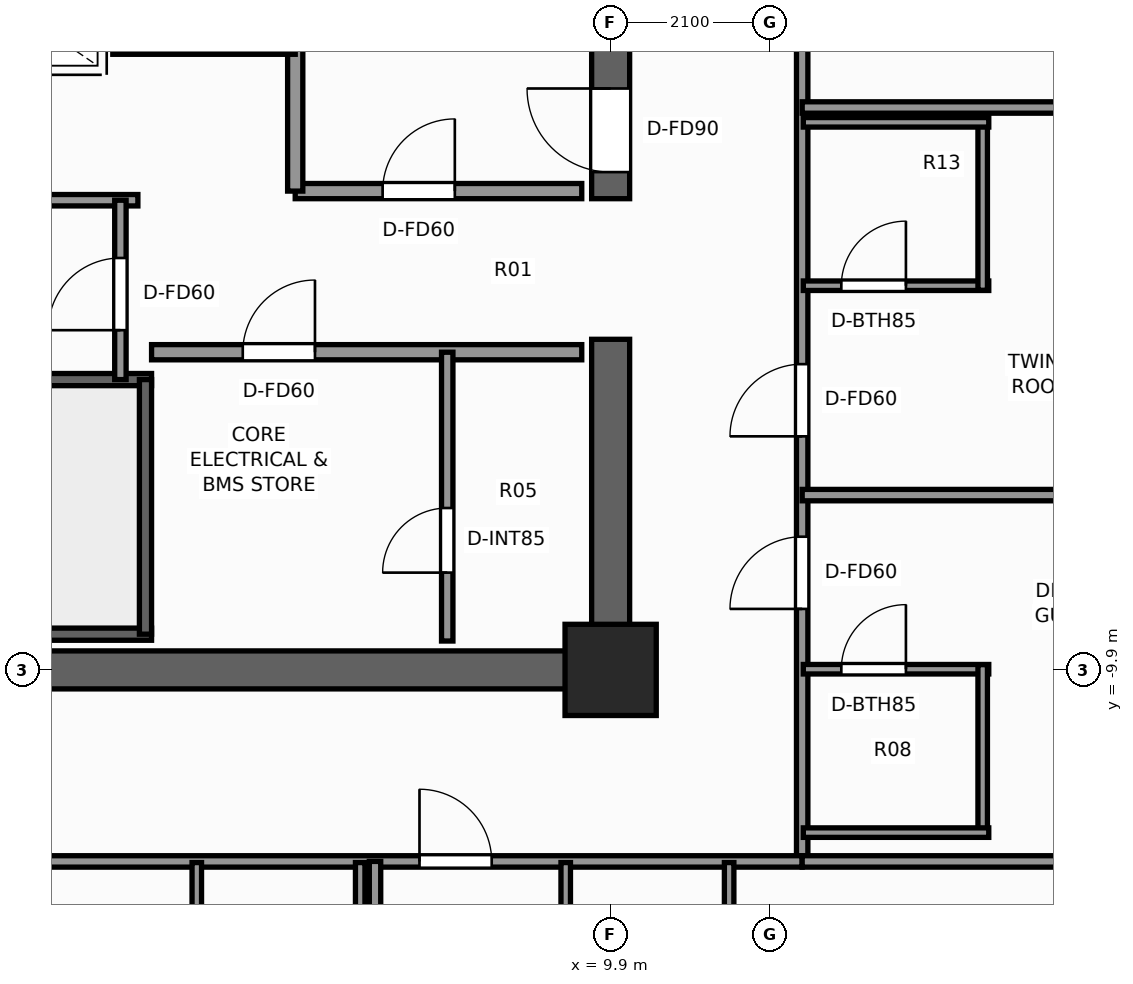
"""IFC4 building model, lengths in metres.
Left out: names, types, materials, properties, quantities, classifications, styles, units other than length and angle.
Written with IfcOpenShell. Run it as: python <this file> out.ifc"""

import sys

from ifc_helpers import new_model, si_unit, direction, frame, frame_2d, origin, origin_2d, place, context, subcontext, project, spatial, rectangle, extrude, element, fill, save


model = new_model("IFC4")
c1 = context("Model", 3, precision=1e-05, world=origin(), true_north=direction((0.0, 1.0)))
c2 = subcontext(c1, "Body", "Model", "MODEL_VIEW")
j1 = project(units=[si_unit("LENGTHUNIT", "METRE"), si_unit("PLANEANGLEUNIT", "RADIAN")], contexts=[c1])
p1 = place(None, origin())
s1 = spatial("IfcSite", under=j1, at=p1, CompositionType="ELEMENT")
p2 = place(p1, origin())
s2 = spatial("IfcBuilding", under=s1, at=p2, CompositionType="ELEMENT")
p3 = place(p2, frame((0.0, 0.0, 141.5)))
s3 = spatial("IfcBuildingStorey", under=s2, at=p3, CompositionType="ELEMENT", Elevation=141.5)
p4 = place(p3, frame((10.15, -9.9, 0.0), z_axis=(0.0, 0.0, 1.0), x_axis=(-1.0, 0.0, 0.0)))
e1 = element("IfcWall", 1, at=p4, inside=s3, PredefinedType="SHEAR", context=c2, shape_type="SweptSolid", body=[
    extrude(rectangle(XDim=12.01, YDim=0.5, at=frame_2d((6.005, 0.0))), origin(), (0.0, 0.0, 1.0), 3.3),
])
p5 = place(p3, frame((9.9, -9.65, 0.0), z_axis=(0.0, 0.0, 1.0), x_axis=(0.0, 1.0, 0.0)))
e2 = element("IfcWall", 2, at=p5, inside=s3, PredefinedType="SHEAR", context=c2, shape_type="SweptSolid", body=[
    extrude(rectangle(XDim=4.1, YDim=0.5, at=frame_2d((2.05, 0.0))), origin(), (0.0, 0.0, 1.0), 3.3),
])
p6 = place(p3, frame((9.9, -3.7, 0.0), z_axis=(0.0, 0.0, 1.0), x_axis=(0.0, 1.0, 0.0)))
e3 = element("IfcWall", 3, at=p6, inside=s3, PredefinedType="SHEAR", context=c2, shape_type="SweptSolid", body=[
    extrude(rectangle(XDim=13.35, YDim=0.5, at=frame_2d((6.675, 0.0))), origin(), (0.0, 0.0, 1.0), 3.3),
])
p7 = place(p6, frame((0.35, 0.0, 0.0)))
e4 = element("IfcOpeningElement", 4, at=p7, cuts=e3, PredefinedType="OPENING", context=c2, shape_type="SweptSolid", body=[
    extrude(rectangle(XDim=1.1, YDim=2.2, at=frame_2d((0.55, 1.1))), frame((0.0, 0.26, 0.0), z_axis=(0.0, -1.0, 0.0), x_axis=(1.0, 0.0, 0.0)), (0.0, 0.0, 1.0), 0.52),
])
p8 = place(p3, frame((9.9, -9.9, 0.0), z_axis=(0.0, 0.0, 1.0), x_axis=(1.0, 0.0, 0.0)))
e5 = element("IfcColumn", 5, at=p8, inside=s3, PredefinedType="COLUMN", context=c2, shape_type="SweptSolid", body=[
    extrude(rectangle(XDim=1.2, YDim=1.2, at=origin_2d()), origin(), (0.0, 0.0, 1.0), 3.3),
])
p9 = place(p3, frame((3.86, -9.43, 0.0), z_axis=(0.0, 0.0, 1.0), x_axis=(-1.0, 0.0, 0.0)))
e6 = element("IfcWall", 6, at=p9, inside=s3, PredefinedType="SHEAR", context=c2, shape_type="SweptSolid", body=[
    extrude(rectangle(XDim=7.72, YDim=0.16, at=frame_2d((3.86, 0.0))), origin(), (0.0, 0.0, 1.0), 3.3),
])
p10 = place(p9, frame((6.01, 0.0, 0.0)))
e7 = element("IfcOpeningElement", 7, at=p10, cuts=e6, PredefinedType="OPENING", context=c2, shape_type="SweptSolid", body=[
    extrude(rectangle(XDim=1.1, YDim=2.2, at=frame_2d((0.55, 1.1))), frame((0.0, 0.09, 0.0), z_axis=(0.0, -1.0, 0.0), x_axis=(1.0, 0.0, 0.0)), (0.0, 0.0, 1.0), 0.18),
])
p11 = place(p3, frame((-3.86, -6.08, 0.0), z_axis=(0.0, 0.0, 1.0), x_axis=(1.0, 0.0, 0.0)))
e8 = element("IfcWall", 8, at=p11, inside=s3, PredefinedType="SHEAR", context=c2, shape_type="SweptSolid", body=[
    extrude(rectangle(XDim=7.72, YDim=0.16, at=frame_2d((3.86, 0.0))), origin(), (0.0, 0.0, 1.0), 3.3),
])
p12 = place(p3, frame((3.78, -9.43, 0.0), z_axis=(0.0, 0.0, 1.0), x_axis=(0.0, 1.0, 0.0)))
e9 = element("IfcWall", 9, at=p12, inside=s3, PredefinedType="SHEAR", context=c2, shape_type="SweptSolid", body=[
    extrude(rectangle(XDim=3.35, YDim=0.16, at=frame_2d((1.675, 0.0))), origin(), (0.0, 0.0, 1.0), 3.3),
])
p13 = place(p3, frame((5.75, -3.6, 0.0), z_axis=(0.0, 0.0, 1.0), x_axis=(1.0, 0.0, 0.0)))
e10 = element("IfcWall", 10, at=p13, inside=s3, PredefinedType="SOLIDWALL", context=c2, shape_type="SweptSolid", body=[
    extrude(rectangle(XDim=3.77, YDim=0.2, at=frame_2d((1.885, 0.0))), origin(), (0.0, 0.0, 1.0), 3.1),
])
p14 = place(p13, frame((1.15, 0.0, 0.0)))
e11 = element("IfcOpeningElement", 11, at=p14, cuts=e10, PredefinedType="OPENING", context=c2, shape_type="SweptSolid", body=[
    extrude(rectangle(XDim=0.95, YDim=2.06, at=frame_2d((0.475, 1.03))), frame((0.0, 0.11, 0.0), z_axis=(0.0, -1.0, 0.0), x_axis=(1.0, 0.0, 0.0)), (0.0, 0.0, 1.0), 0.22),
])
p15 = place(p3, frame((5.75, -3.6, 0.0), z_axis=(0.0, 0.0, 1.0), x_axis=(0.0, 1.0, 0.0)))
e12 = element("IfcWall", 12, at=p15, inside=s3, PredefinedType="SOLIDWALL", context=c2, shape_type="SweptSolid", body=[
    extrude(rectangle(XDim=5.57, YDim=0.2, at=frame_2d((2.785, 0.0))), origin(), (0.0, 0.0, 1.0), 2.735),
])
p16 = place(p15, frame((2.75, 0.0, 0.0)))
e13 = element("IfcOpeningElement", 13, at=p16, cuts=e12, PredefinedType="OPENING", context=c2, shape_type="SweptSolid", body=[
    extrude(rectangle(XDim=1.1, YDim=2.2, at=frame_2d((0.55, 1.1))), frame((0.0, 0.11, 0.0), z_axis=(0.0, -1.0, 0.0), x_axis=(1.0, 0.0, 0.0)), (0.0, 0.0, 1.0), 0.22),
])
p17 = place(p3, frame((3.35, -1.7, 0.0), z_axis=(0.0, 0.0, 1.0), x_axis=(1.0, 0.0, 0.0)))
e14 = element("IfcWall", 14, at=p17, inside=s3, PredefinedType="SOLIDWALL", context=c2, shape_type="SweptSolid", body=[
    extrude(rectangle(XDim=2.4, YDim=0.2, at=frame_2d((1.2, 0.0))), origin(), (0.0, 0.0, 1.0), 3.1),
])
p18 = place(p3, frame((3.86, -5.72, 0.0), z_axis=(0.0, 0.0, 1.0), x_axis=(1.0, 0.0, 0.0)))
e15 = element("IfcWall", 15, at=p18, inside=s3, PredefinedType="SOLIDWALL", context=c2, shape_type="SweptSolid", body=[
    extrude(rectangle(XDim=5.66, YDim=0.2, at=frame_2d((2.83, 0.0))), origin(), (0.0, 0.0, 1.0), 3.1),
])
p19 = place(p18, frame((1.2, 0.0, 0.0)))
e16 = element("IfcOpeningElement", 16, at=p19, cuts=e15, PredefinedType="OPENING", context=c2, shape_type="SweptSolid", body=[
    extrude(rectangle(XDim=0.95, YDim=2.06, at=frame_2d((0.475, 1.03))), frame((0.0, 0.11, 0.0), z_axis=(0.0, -1.0, 0.0), x_axis=(1.0, 0.0, 0.0)), (0.0, 0.0, 1.0), 0.22),
])
p20 = place(p3, frame((7.75, -9.52, 0.0), z_axis=(0.0, 0.0, 1.0), x_axis=(0.0, 1.0, 0.0)))
e17 = element("IfcWall", 17, at=p20, inside=s3, PredefinedType="PARTITIONING", context=c2, shape_type="SweptSolid", body=[
    extrude(rectangle(XDim=3.8, YDim=0.15, at=frame_2d((1.9, 0.0))), origin(), (0.0, 0.0, 1.0), 3.1),
])
p21 = place(p20, frame((0.9, 0.0, 0.0)))
e18 = element("IfcOpeningElement", 18, at=p21, cuts=e17, PredefinedType="OPENING", context=c2, shape_type="SweptSolid", body=[
    extrude(rectangle(XDim=0.85, YDim=2.03, at=frame_2d((0.425, 1.015))), frame((0.0, 0.085, 0.0), z_axis=(0.0, -1.0, 0.0), x_axis=(1.0, 0.0, 0.0)), (0.0, 0.0, 1.0), 0.17),
])
p22 = place(p3, frame((-3.68, -3.72, 0.0), z_axis=(0.0, 0.0, 1.0), x_axis=(1.0, 0.0, 0.0)))
e19 = element("IfcWall", 19, at=p22, inside=s3, PredefinedType="PARTITIONING", context=c2, shape_type="SweptSolid", body=[
    extrude(rectangle(XDim=7.36, YDim=0.15, at=frame_2d((3.68, 0.0))), origin(), (0.0, 0.0, 1.0), 3.1),
])
p23 = place(p3, frame((3.45, -6.08, 0.0), z_axis=(0.0, 0.0, 1.0), x_axis=(0.0, 1.0, 0.0)))
e20 = element("IfcWall", 20, at=p23, inside=s3, PredefinedType="PARTITIONING", context=c2, shape_type="SweptSolid", body=[
    extrude(rectangle(XDim=2.36, YDim=0.15, at=frame_2d((1.18, 0.0))), origin(), (0.0, 0.0, 1.0), 3.1),
])
p24 = place(p23, frame((0.65, 0.0, 0.0)))
e21 = element("IfcOpeningElement", 21, at=p24, cuts=e20, PredefinedType="OPENING", context=c2, shape_type="SweptSolid", body=[
    extrude(rectangle(XDim=0.95, YDim=2.06, at=frame_2d((0.475, 1.03))), frame((0.0, 0.085, 0.0), z_axis=(0.0, -1.0, 0.0), x_axis=(1.0, 0.0, 0.0)), (0.0, 0.0, 1.0), 0.17),
])
p25 = place(p3, frame((12.42, -12.42, 0.0), z_axis=(0.0, 0.0, 1.0), x_axis=(0.0, 1.0, 0.0)))
e22 = element("IfcWall", 22, at=p25, inside=s3, PredefinedType="PARTITIONING", context=c2, shape_type="SweptSolid", body=[
    extrude(rectangle(XDim=24.84, YDim=0.15, at=frame_2d((12.42, 0.0))), origin(), (0.0, 0.0, 1.0), 2.312),
])
p26 = place(p25, frame((3.323, 0.0, 0.0)))
e23 = element("IfcOpeningElement", 23, at=p26, cuts=e22, PredefinedType="OPENING", context=c2, shape_type="SweptSolid", body=[
    extrude(rectangle(XDim=0.95, YDim=2.06, at=frame_2d((0.475, 1.03))), frame((0.0, 0.085, 0.0), z_axis=(0.0, -1.0, 0.0), x_axis=(1.0, 0.0, 0.0)), (0.0, 0.0, 1.0), 0.17),
])
p27 = place(p25, frame((5.593, 0.0, 0.0)))
e24 = element("IfcOpeningElement", 24, at=p27, cuts=e22, PredefinedType="OPENING", context=c2, shape_type="SweptSolid", body=[
    extrude(rectangle(XDim=0.95, YDim=2.06, at=frame_2d((0.475, 1.03))), frame((0.0, 0.085, 0.0), z_axis=(0.0, -1.0, 0.0), x_axis=(1.0, 0.0, 0.0)), (0.0, 0.0, 1.0), 0.17),
])
p28 = place(p25, frame((15.073, 0.0, 0.0)))
e25 = element("IfcOpeningElement", 25, at=p28, cuts=e22, PredefinedType="OPENING", context=c2, shape_type="SweptSolid", body=[
    extrude(rectangle(XDim=0.95, YDim=2.06, at=frame_2d((0.475, 1.03))), frame((0.0, 0.085, 0.0), z_axis=(0.0, -1.0, 0.0), x_axis=(1.0, 0.0, 0.0)), (0.0, 0.0, 1.0), 0.17),
])
p29 = place(p25, frame((20.05, 0.0, 0.0)))
e26 = element("IfcOpeningElement", 26, at=p29, cuts=e22, PredefinedType="OPENING", context=c2, shape_type="SweptSolid", body=[
    extrude(rectangle(XDim=0.95, YDim=2.06, at=frame_2d((0.475, 1.03))), frame((0.0, 0.085, 0.0), z_axis=(0.0, -1.0, 0.0), x_axis=(1.0, 0.0, 0.0)), (0.0, 0.0, 1.0), 0.17),
])
p30 = place(p3, frame((-3.65, -12.42, 0.0), z_axis=(0.0, 0.0, 1.0), x_axis=(1.0, 0.0, 0.0)))
e27 = element("IfcWall", 27, at=p30, inside=s3, PredefinedType="PARTITIONING", context=c2, shape_type="SweptSolid", body=[
    extrude(rectangle(XDim=16.07, YDim=0.15, at=frame_2d((8.035, 0.0))), origin(), (0.0, 0.0, 1.0), 2.312),
])
p31 = place(p30, frame((5.205, 0.0, 0.0)))
e28 = element("IfcOpeningElement", 28, at=p31, cuts=e27, PredefinedType="OPENING", context=c2, shape_type="SweptSolid", body=[
    extrude(rectangle(XDim=0.95, YDim=2.06, at=frame_2d((0.475, 1.03))), frame((0.0, 0.085, 0.0), z_axis=(0.0, -1.0, 0.0), x_axis=(1.0, 0.0, 0.0)), (0.0, 0.0, 1.0), 0.17),
])
p32 = place(p30, frame((11.035, 0.0, 0.0)))
e29 = element("IfcOpeningElement", 29, at=p32, cuts=e27, PredefinedType="OPENING", context=c2, shape_type="SweptSolid", body=[
    extrude(rectangle(XDim=0.95, YDim=2.06, at=frame_2d((0.475, 1.03))), frame((0.0, 0.085, 0.0), z_axis=(0.0, -1.0, 0.0), x_axis=(1.0, 0.0, 0.0)), (0.0, 0.0, 1.0), 0.17),
])
p33 = place(p3, frame((12.42, -12.42, 0.0), z_axis=(0.0, 0.0, 1.0), x_axis=(1.0, 0.0, 0.0)))
e30 = element("IfcWall", 30, at=p33, inside=s3, PredefinedType="PARTITIONING", context=c2, shape_type="SweptSolid", body=[
    extrude(rectangle(XDim=3.66, YDim=0.15, at=frame_2d((1.83, 0.0))), origin(), (0.0, 0.0, 1.0), 3.1),
])
p34 = place(p3, frame((12.42, -7.6, 0.0), z_axis=(0.0, 0.0, 1.0), x_axis=(1.0, 0.0, 0.0)))
e31 = element("IfcWall", 31, at=p34, inside=s3, PredefinedType="PARTITIONING", context=c2, shape_type="SweptSolid", body=[
    extrude(rectangle(XDim=5.56, YDim=0.15, at=frame_2d((2.78, 0.0))), origin(), (0.0, 0.0, 1.0), 2.469),
])
p35 = place(p3, frame((12.435, -9.891, 0.0), z_axis=(0.0, 0.0, 1.0), x_axis=(1.0, 0.0, 0.0)))
e32 = element("IfcWall", 32, at=p35, inside=s3, PredefinedType="PARTITIONING", context=c2, shape_type="SweptSolid", body=[
    extrude(rectangle(XDim=2.44, YDim=0.125, at=frame_2d((1.22, 0.0))), origin(), (0.0, 0.0, 1.0), 3.1),
])
p36 = place(p35, frame((0.5, 0.0, 0.0)))
e33 = element("IfcOpeningElement", 33, at=p36, cuts=e32, PredefinedType="OPENING", context=c2, shape_type="SweptSolid", body=[
    extrude(rectangle(XDim=0.85, YDim=2.03, at=frame_2d((0.425, 1.015))), frame((0.0, 0.073, 0.0), z_axis=(0.0, -1.0, 0.0), x_axis=(1.0, 0.0, 0.0)), (0.0, 0.0, 1.0), 0.145),
])
p37 = place(p3, frame((14.795, -12.101, 0.0), z_axis=(0.0, 0.0, 1.0), x_axis=(0.0, 1.0, 0.0)))
e34 = element("IfcWall", 34, at=p37, inside=s3, PredefinedType="PARTITIONING", context=c2, shape_type="SweptSolid", body=[
    extrude(rectangle(XDim=2.27, YDim=0.125, at=frame_2d((1.135, 0.0))), origin(), (0.0, 0.0, 1.0), 2.312),
])
p38 = place(p3, frame((12.435, -12.041, 0.0), z_axis=(0.0, 0.0, 1.0), x_axis=(1.0, 0.0, 0.0)))
e35 = element("IfcWall", 35, at=p38, inside=s3, PredefinedType="PARTITIONING", context=c2, shape_type="SweptSolid", body=[
    extrude(rectangle(XDim=2.44, YDim=0.125, at=frame_2d((1.22, 0.0))), origin(), (0.0, 0.0, 1.0), 3.1),
])
p39 = place(p3, frame((12.42, -2.5, 0.0), z_axis=(0.0, 0.0, 1.0), x_axis=(1.0, 0.0, 0.0)))
e36 = element("IfcWall", 36, at=p39, inside=s3, PredefinedType="PARTITIONING", context=c2, shape_type="SweptSolid", body=[
    extrude(rectangle(XDim=5.56, YDim=0.15, at=frame_2d((2.78, 0.0))), origin(), (0.0, 0.0, 1.0), 2.469),
])
p40 = place(p3, frame((12.435, -4.845, 0.0), z_axis=(0.0, 0.0, 1.0), x_axis=(1.0, 0.0, 0.0)))
e37 = element("IfcWall", 37, at=p40, inside=s3, PredefinedType="PARTITIONING", context=c2, shape_type="SweptSolid", body=[
    extrude(rectangle(XDim=2.44, YDim=0.125, at=frame_2d((1.22, 0.0))), origin(), (0.0, 0.0, 1.0), 2.312),
])
p41 = place(p40, frame((0.5, 0.0, 0.0)))
e38 = element("IfcOpeningElement", 38, at=p41, cuts=e37, PredefinedType="OPENING", context=c2, shape_type="SweptSolid", body=[
    extrude(rectangle(XDim=0.85, YDim=2.03, at=frame_2d((0.425, 1.015))), frame((0.0, 0.073, 0.0), z_axis=(0.0, -1.0, 0.0), x_axis=(1.0, 0.0, 0.0)), (0.0, 0.0, 1.0), 0.145),
])
p42 = place(p3, frame((14.795, -4.905, 0.0), z_axis=(0.0, 0.0, 1.0), x_axis=(0.0, 1.0, 0.0)))
e39 = element("IfcWall", 39, at=p42, inside=s3, PredefinedType="PARTITIONING", context=c2, shape_type="SweptSolid", body=[
    extrude(rectangle(XDim=2.27, YDim=0.125, at=frame_2d((1.135, 0.0))), origin(), (0.0, 0.0, 1.0), 2.312),
])
p43 = place(p3, frame((12.435, -2.695, 0.0), z_axis=(0.0, 0.0, 1.0), x_axis=(1.0, 0.0, 0.0)))
e40 = element("IfcWall", 40, at=p43, inside=s3, PredefinedType="PARTITIONING", context=c2, shape_type="SweptSolid", body=[
    extrude(rectangle(XDim=2.44, YDim=0.125, at=frame_2d((1.22, 0.0))), origin(), (0.0, 0.0, 1.0), 3.1),
])
p44 = place(p3, frame((6.8, -17.98, 0.0), z_axis=(0.0, 0.0, 1.0), x_axis=(0.0, 1.0, 0.0)))
e41 = element("IfcWall", 41, at=p44, inside=s3, PredefinedType="PARTITIONING", context=c2, shape_type="SweptSolid", body=[
    extrude(rectangle(XDim=5.56, YDim=0.15, at=frame_2d((2.78, 0.0))), origin(), (0.0, 0.0, 1.0), 2.469),
])
p45 = place(p3, frame((4.455, -14.875, 0.0), z_axis=(0.0, 0.0, 1.0), x_axis=(0.0, 1.0, 0.0)))
e42 = element("IfcWall", 42, at=p45, inside=s3, PredefinedType="PARTITIONING", context=c2, shape_type="SweptSolid", body=[
    extrude(rectangle(XDim=2.44, YDim=0.125, at=frame_2d((1.22, 0.0))), origin(), (0.0, 0.0, 1.0), 2.312),
])
p46 = place(p45, frame((0.5, 0.0, 0.0)))
e43 = element("IfcOpeningElement", 43, at=p46, cuts=e42, PredefinedType="OPENING", context=c2, shape_type="SweptSolid", body=[
    extrude(rectangle(XDim=0.85, YDim=2.03, at=frame_2d((0.425, 1.015))), frame((0.0, 0.073, 0.0), z_axis=(0.0, -1.0, 0.0), x_axis=(1.0, 0.0, 0.0)), (0.0, 0.0, 1.0), 0.145),
])
p47 = place(p3, frame((6.605, -14.875, 0.0), z_axis=(0.0, 0.0, 1.0), x_axis=(0.0, 1.0, 0.0)))
e44 = element("IfcWall", 44, at=p47, inside=s3, PredefinedType="PARTITIONING", context=c2, shape_type="SweptSolid", body=[
    extrude(rectangle(XDim=2.44, YDim=0.125, at=frame_2d((1.22, 0.0))), origin(), (0.0, 0.0, 1.0), 3.1),
])
p48 = place(p3, frame((9.309, -14.875, 0.0), z_axis=(0.0, 0.0, 1.0), x_axis=(0.0, 1.0, 0.0)))
e45 = element("IfcWall", 45, at=p48, inside=s3, PredefinedType="PARTITIONING", context=c2, shape_type="SweptSolid", body=[
    extrude(rectangle(XDim=2.44, YDim=0.125, at=frame_2d((1.22, 0.0))), origin(), (0.0, 0.0, 1.0), 3.1),
])
p49 = place(p48, frame((0.5, 0.0, 0.0)))
e46 = element("IfcOpeningElement", 46, at=p49, cuts=e45, PredefinedType="OPENING", context=c2, shape_type="SweptSolid", body=[
    extrude(rectangle(XDim=0.85, YDim=2.03, at=frame_2d((0.425, 1.015))), frame((0.0, 0.073, 0.0), z_axis=(0.0, -1.0, 0.0), x_axis=(1.0, 0.0, 0.0)), (0.0, 0.0, 1.0), 0.145),
])
p50 = place(p3, frame((11.459, -14.875, 0.0), z_axis=(0.0, 0.0, 1.0), x_axis=(0.0, 1.0, 0.0)))
e47 = element("IfcWall", 47, at=p50, inside=s3, PredefinedType="PARTITIONING", context=c2, shape_type="SweptSolid", body=[
    extrude(rectangle(XDim=2.44, YDim=0.125, at=frame_2d((1.22, 0.0))), origin(), (0.0, 0.0, 1.0), 3.1),
])
p51 = place(p7, origin())
e48 = element("IfcDoor", 48, at=p51, inside=s3, OperationType="SINGLE_SWING_RIGHT", PredefinedType="DOOR", context=c2, shape_type="SweptSolid", body=[
    extrude(rectangle(XDim=1.1, YDim=2.2, at=frame_2d((0.55, 1.1))), frame((0.0, 0.025, 0.0), z_axis=(0.0, -1.0, 0.0), x_axis=(1.0, 0.0, 0.0)), (0.0, 0.0, 1.0), 0.05),
])
fill(e4, e48)
p52 = place(p19, origin())
e49 = element("IfcDoor", 49, at=p52, inside=s3, OperationType="SINGLE_SWING_RIGHT", PredefinedType="DOOR", context=c2, shape_type="SweptSolid", body=[
    extrude(rectangle(XDim=0.95, YDim=2.06, at=frame_2d((0.475, 1.03))), frame((0.0, 0.025, 0.0), z_axis=(0.0, -1.0, 0.0), x_axis=(1.0, 0.0, 0.0)), (0.0, 0.0, 1.0), 0.05),
])
fill(e16, e49)
p53 = place(p21, origin())
e50 = element("IfcDoor", 50, at=p53, inside=s3, OperationType="SINGLE_SWING_LEFT", PredefinedType="DOOR", context=c2, shape_type="SweptSolid", body=[
    extrude(rectangle(XDim=0.85, YDim=2.03, at=frame_2d((0.425, 1.015))), frame((0.0, 0.025, 0.0), z_axis=(0.0, -1.0, 0.0), x_axis=(1.0, 0.0, 0.0)), (0.0, 0.0, 1.0), 0.05),
])
fill(e18, e50)
p54 = place(p14, origin())
e51 = element("IfcDoor", 51, at=p54, inside=s3, OperationType="SINGLE_SWING_RIGHT", PredefinedType="DOOR", context=c2, shape_type="SweptSolid", body=[
    extrude(rectangle(XDim=0.95, YDim=2.06, at=frame_2d((0.475, 1.03))), frame((0.0, 0.025, 0.0), z_axis=(0.0, -1.0, 0.0), x_axis=(1.0, 0.0, 0.0)), (0.0, 0.0, 1.0), 0.05),
])
fill(e11, e51)
p55 = place(p24, origin())
e52 = element("IfcDoor", 52, at=p55, inside=s3, OperationType="SINGLE_SWING_LEFT", PredefinedType="DOOR", context=c2, shape_type="SweptSolid", body=[
    extrude(rectangle(XDim=0.95, YDim=2.06, at=frame_2d((0.475, 1.03))), frame((0.0, 0.025, 0.0), z_axis=(0.0, -1.0, 0.0), x_axis=(1.0, 0.0, 0.0)), (0.0, 0.0, 1.0), 0.05),
])
fill(e21, e52)
p56 = place(p36, origin())
e53 = element("IfcDoor", 53, at=p56, inside=s3, OperationType="SINGLE_SWING_RIGHT", PredefinedType="DOOR", context=c2, shape_type="SweptSolid", body=[
    extrude(rectangle(XDim=0.85, YDim=2.03, at=frame_2d((0.425, 1.015))), frame((0.0, 0.025, 0.0), z_axis=(0.0, -1.0, 0.0), x_axis=(1.0, 0.0, 0.0)), (0.0, 0.0, 1.0), 0.05),
])
fill(e33, e53)
p57 = place(p26, origin())
e54 = element("IfcDoor", 54, at=p57, inside=s3, OperationType="SINGLE_SWING_LEFT", PredefinedType="DOOR", context=c2, shape_type="SweptSolid", body=[
    extrude(rectangle(XDim=0.95, YDim=2.06, at=frame_2d((0.475, 1.03))), frame((0.0, 0.025, 0.0), z_axis=(0.0, -1.0, 0.0), x_axis=(1.0, 0.0, 0.0)), (0.0, 0.0, 1.0), 0.05),
])
fill(e23, e54)
p58 = place(p41, origin())
e55 = element("IfcDoor", 55, at=p58, inside=s3, OperationType="SINGLE_SWING_RIGHT", PredefinedType="DOOR", context=c2, shape_type="SweptSolid", body=[
    extrude(rectangle(XDim=0.85, YDim=2.03, at=frame_2d((0.425, 1.015))), frame((0.0, 0.025, 0.0), z_axis=(0.0, -1.0, 0.0), x_axis=(1.0, 0.0, 0.0)), (0.0, 0.0, 1.0), 0.05),
])
fill(e38, e55)
p59 = place(p27, origin())
e56 = element("IfcDoor", 56, at=p59, inside=s3, OperationType="SINGLE_SWING_LEFT", PredefinedType="DOOR", context=c2, shape_type="SweptSolid", body=[
    extrude(rectangle(XDim=0.95, YDim=2.06, at=frame_2d((0.475, 1.03))), frame((0.0, 0.025, 0.0), z_axis=(0.0, -1.0, 0.0), x_axis=(1.0, 0.0, 0.0)), (0.0, 0.0, 1.0), 0.05),
])
fill(e24, e56)
p60 = place(p32, origin())
e57 = element("IfcDoor", 57, at=p60, inside=s3, OperationType="SINGLE_SWING_LEFT", PredefinedType="DOOR", context=c2, shape_type="SweptSolid", body=[
    extrude(rectangle(XDim=0.95, YDim=2.06, at=frame_2d((0.475, 1.03))), frame((0.0, 0.025, 0.0), z_axis=(0.0, -1.0, 0.0), x_axis=(1.0, 0.0, 0.0)), (0.0, 0.0, 1.0), 0.05),
])
fill(e29, e57)
save(model, sys.argv[1])
